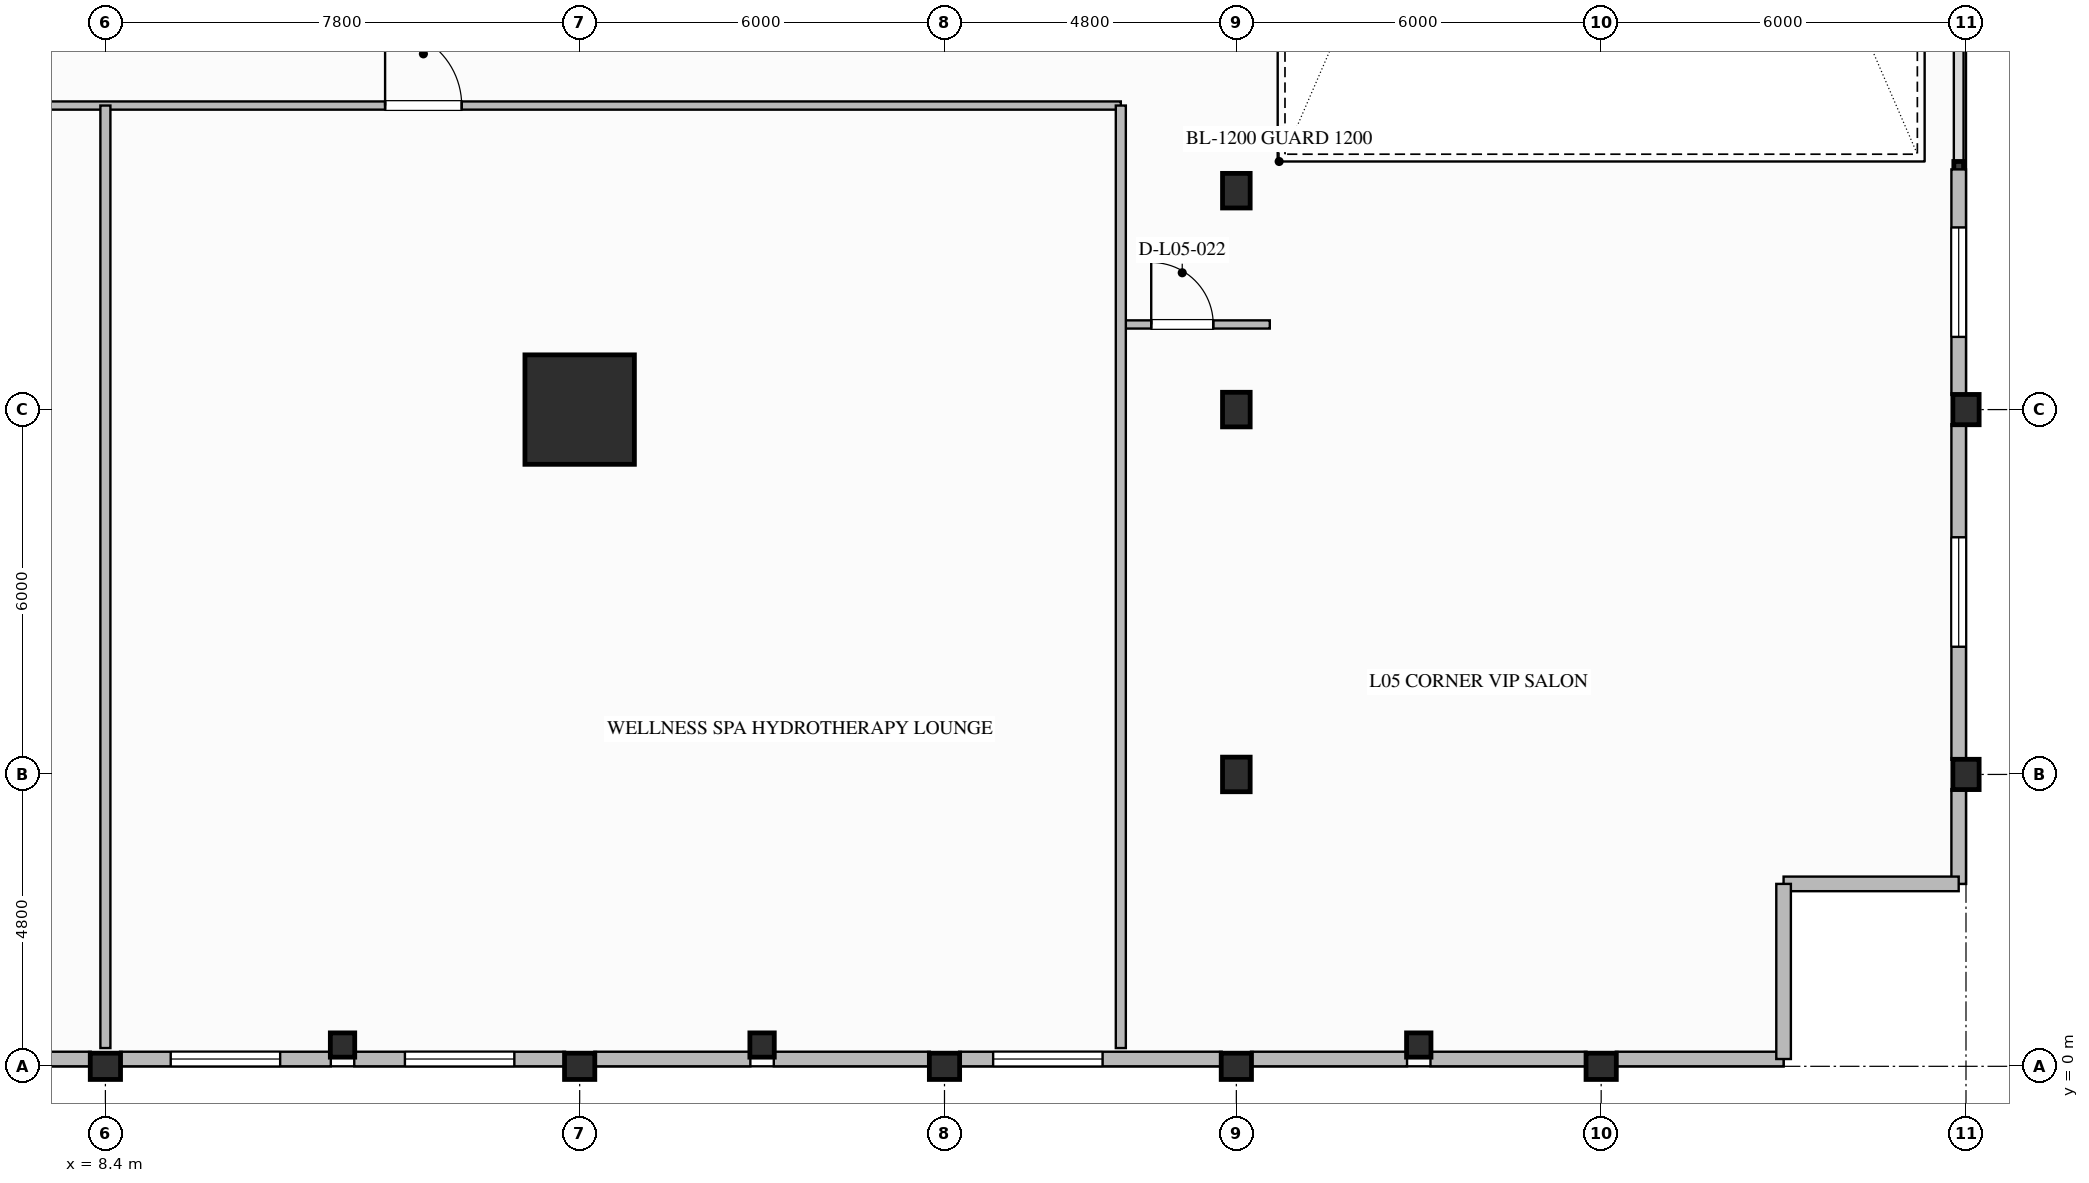
"""IFC4 building model, lengths in metres.
Left out: names, types, materials, properties, quantities, classifications, styles, units other than length and angle.
Written with IfcOpenShell. Run it as: python <this file> out.ifc"""

import sys

from ifc_helpers import new_model, si_unit, direction, frame, frame_2d, origin, origin_2d, place, context, subcontext, project, spatial, rectangle, i_section, extrude, element, fill, save


model = new_model("IFC4")
c1 = context("Model", 3, precision=1e-05, world=origin(), true_north=direction((0.0, 1.0)))
c2 = subcontext(c1, "Body", "Model", "MODEL_VIEW")
j1 = project(units=[si_unit("LENGTHUNIT", "METRE"), si_unit("PLANEANGLEUNIT", "RADIAN")], contexts=[c1])
p1 = place(None, origin())
s1 = spatial("IfcSite", under=j1, at=p1, CompositionType="ELEMENT")
p2 = place(p1, origin())
s2 = spatial("IfcBuilding", under=s1, at=p2, CompositionType="ELEMENT")
p3 = place(p2, frame((0.0, 0.0, 27.6)))
s3 = spatial("IfcBuildingStorey", under=s2, at=p3, CompositionType="ELEMENT", Elevation=27.6)
p4 = place(p3, frame((16.2, 10.8, 0.0), z_axis=(0.0, 0.0, 1.0), x_axis=(1.0, 0.0, 0.0)))
e1 = element("IfcColumn", 1, at=p4, inside=s3, PredefinedType="COLUMN", context=c2, shape_type="SweptSolid", body=[
    extrude(rectangle(XDim=1.8, YDim=1.8, at=origin_2d()), origin(), (0.0, 0.0, 1.0), 5.6),
])
for number, where, z_axis, x_axis in (
    (2, (39.0, 4.8, 0.0), (0.0, 0.0, 1.0), (1.0, 0.0, 0.0)),
    (3, (39.0, 10.8, 0.0), (0.0, 0.0, 1.0), (1.0, 0.0, 0.0)),
    (4, (8.4, 0.0, 0.0), (0.0, 0.0, 1.0), (0.0, 1.0, 0.0)),
    (5, (16.2, 0.0, 0.0), (0.0, 0.0, 1.0), (0.0, 1.0, 0.0)),
    (6, (22.2, 0.0, 0.0), (0.0, 0.0, 1.0), (0.0, 1.0, 0.0)),
    (7, (27.0, 0.0, 0.0), (0.0, 0.0, 1.0), (0.0, 1.0, 0.0)),
    (8, (33.0, 0.0, 0.0), (0.0, 0.0, 1.0), (0.0, 1.0, 0.0)),
):
    element("IfcColumn", number, at=place(p3, frame(where, z_axis=z_axis, x_axis=x_axis)), inside=s3, PredefinedType="COLUMN", context=c2, shape_type="SweptSolid", body=[
        extrude(i_section(OverallWidth=0.432, OverallDepth=0.498, WebThickness=0.056, FlangeThickness=0.089, FilletRadius=0.03, at=origin_2d()), origin(), (0.0, 0.0, 1.0), 5.32),
    ])
for number, where, z_axis, x_axis in (
    (9, (27.0, 4.8, 0.0), (0.0, 0.0, 1.0), (1.0, 0.0, 0.0)),
    (10, (27.0, 10.8, 0.0), (0.0, 0.0, 1.0), (1.0, 0.0, 0.0)),
    (11, (27.0, 14.4, 0.0), (0.0, 0.0, 1.0), (1.0, 0.0, 0.0)),
):
    element("IfcColumn", number, at=place(p3, frame(where, z_axis=z_axis, x_axis=x_axis)), inside=s3, PredefinedType="COLUMN", context=c2, shape_type="SweptSolid", body=[
        extrude(i_section(OverallWidth=0.454, OverallDepth=0.569, WebThickness=0.078, FlangeThickness=0.125, FilletRadius=0.03, at=origin_2d()), origin(), (0.0, 0.0, 1.0), 5.32),
    ])
for number, where, z_axis, x_axis in (
    (12, (12.3, 0.35, 0.0), (0.0, 0.0, 1.0), (1.0, 0.0, 0.0)),
    (13, (19.2, 0.35, 0.0), (0.0, 0.0, 1.0), (1.0, 0.0, 0.0)),
    (14, (30.0, 0.35, 0.0), (0.0, 0.0, 1.0), (1.0, 0.0, 0.0)),
):
    element("IfcColumn", number, at=place(p3, frame(where, z_axis=z_axis, x_axis=x_axis)), inside=s3, PredefinedType="COLUMN", context=c2, shape_type="SweptSolid", body=[
        extrude(i_section(OverallWidth=0.401, OverallDepth=0.399, WebThickness=0.025, FlangeThickness=0.04, FilletRadius=0.025, at=origin_2d()), origin(), (0.0, 0.0, 1.0), 5.32),
    ])
p5 = place(p3, frame((38.88, 4.559, 0.0), z_axis=(0.0, 0.0, 1.0), x_axis=(0.0, -1.0, 0.0)))
e15 = element("IfcWall", 15, at=p5, inside=s3, PredefinedType="STANDARD", context=c2, shape_type="SweptSolid", body=[
    extrude(rectangle(XDim=1.559, YDim=0.24, at=frame_2d((0.78, 0.0))), origin(), (0.0, 0.0, 1.0), 5.32),
])
p6 = place(p3, frame((38.88, 10.559, 0.0), z_axis=(0.0, 0.0, 1.0), x_axis=(0.0, -1.0, 0.0)))
e16 = element("IfcWall", 16, at=p6, inside=s3, PredefinedType="STANDARD", context=c2, shape_type="SweptSolid", body=[
    extrude(rectangle(XDim=5.518, YDim=0.24, at=frame_2d((2.759, 0.0))), origin(), (0.0, 0.0, 1.0), 4.625),
])
p7 = place(p6, frame((1.859, 0.0, 0.85)))
e17 = element("IfcOpeningElement", 17, at=p7, cuts=e16, PredefinedType="OPENING", context=c2, shape_type="SweptSolid", body=[
    extrude(rectangle(XDim=1.8, YDim=2.2, at=frame_2d((0.9, 1.1))), frame((0.0, 0.13, 0.0), z_axis=(0.0, -1.0, 0.0), x_axis=(1.0, 0.0, 0.0)), (0.0, 0.0, 1.0), 0.26),
])
p8 = place(p3, frame((38.88, 14.75, 0.0), z_axis=(0.0, 0.0, 1.0), x_axis=(0.0, -1.0, 0.0)))
e18 = element("IfcWall", 18, at=p8, inside=s3, PredefinedType="STANDARD", context=c2, shape_type="SweptSolid", body=[
    extrude(rectangle(XDim=3.709, YDim=0.24, at=frame_2d((1.854, 0.0))), origin(), (0.0, 0.0, 1.0), 4.625),
])
p9 = place(p8, frame((0.955, 0.0, 0.85)))
e19 = element("IfcOpeningElement", 19, at=p9, cuts=e18, PredefinedType="OPENING", context=c2, shape_type="SweptSolid", body=[
    extrude(rectangle(XDim=1.8, YDim=2.2, at=frame_2d((0.9, 1.1))), frame((0.0, 0.13, 0.0), z_axis=(0.0, -1.0, 0.0), x_axis=(1.0, 0.0, 0.0)), (0.0, 0.0, 1.0), 0.26),
])
p10 = place(p3, frame((8.159, 0.12, 0.0), z_axis=(0.0, 0.0, 1.0), x_axis=(-1.0, 0.0, 0.0)))
e20 = element("IfcWall", 20, at=p10, inside=s3, PredefinedType="STANDARD", context=c2, shape_type="SweptSolid", body=[
    extrude(rectangle(XDim=3.767, YDim=0.24, at=frame_2d((1.883, 0.0))), origin(), (0.0, 0.0, 1.0), 3.52),
])
p11 = place(p10, frame((0.983, 0.0, 0.65)))
e21 = element("IfcOpeningElement", 21, at=p11, cuts=e20, PredefinedType="OPENING", context=c2, shape_type="SweptSolid", body=[
    extrude(rectangle(XDim=1.8, YDim=2.2, at=frame_2d((0.9, 1.1))), frame((0.0, 0.13, 0.0), z_axis=(0.0, -1.0, 0.0), x_axis=(1.0, 0.0, 0.0)), (0.0, 0.0, 1.0), 0.26),
])
p12 = place(p3, frame((12.107, 0.12, 0.0), z_axis=(0.0, 0.0, 1.0), x_axis=(-1.0, 0.0, 0.0)))
e22 = element("IfcWall", 22, at=p12, inside=s3, PredefinedType="STANDARD", context=c2, shape_type="SweptSolid", body=[
    extrude(rectangle(XDim=3.467, YDim=0.24, at=frame_2d((1.733, 0.0))), origin(), (0.0, 0.0, 1.0), 3.52),
])
p13 = place(p12, frame((0.833, 0.0, 0.65)))
e23 = element("IfcOpeningElement", 23, at=p13, cuts=e22, PredefinedType="OPENING", context=c2, shape_type="SweptSolid", body=[
    extrude(rectangle(XDim=1.8, YDim=2.2, at=frame_2d((0.9, 1.1))), frame((0.0, 0.13, 0.0), z_axis=(0.0, -1.0, 0.0), x_axis=(1.0, 0.0, 0.0)), (0.0, 0.0, 1.0), 0.26),
])
p14 = place(p3, frame((15.959, 0.12, 0.0), z_axis=(0.0, 0.0, 1.0), x_axis=(-1.0, 0.0, 0.0)))
e24 = element("IfcWall", 24, at=p14, inside=s3, PredefinedType="STANDARD", context=c2, shape_type="SweptSolid", body=[
    extrude(rectangle(XDim=3.466, YDim=0.24, at=frame_2d((1.733, 0.0))), origin(), (0.0, 0.0, 1.0), 3.52),
])
p15 = place(p14, frame((0.833, 0.0, 0.65)))
e25 = element("IfcOpeningElement", 25, at=p15, cuts=e24, PredefinedType="OPENING", context=c2, shape_type="SweptSolid", body=[
    extrude(rectangle(XDim=1.8, YDim=2.2, at=frame_2d((0.9, 1.1))), frame((0.0, 0.13, 0.0), z_axis=(0.0, -1.0, 0.0), x_axis=(1.0, 0.0, 0.0)), (0.0, 0.0, 1.0), 0.26),
])
for number, where, z_axis, x_axis in (
    (26, (19.007, 0.12, 0.0), (0.0, 0.0, 1.0), (-1.0, 0.0, 0.0)),
    (27, (21.959, 0.12, 0.0), (0.0, 0.0, 1.0), (-1.0, 0.0, 0.0)),
):
    element("IfcWall", number, at=place(p3, frame(where, z_axis=z_axis, x_axis=x_axis)), inside=s3, PredefinedType="STANDARD", context=c2, shape_type="SweptSolid", body=[
        extrude(rectangle(XDim=2.566, YDim=0.24, at=frame_2d((1.283, 0.0))), origin(), (0.0, 0.0, 1.0), 4.625),
    ])
p16 = place(p3, frame((26.759, 0.12, 0.0), z_axis=(0.0, 0.0, 1.0), x_axis=(-1.0, 0.0, 0.0)))
e28 = element("IfcWall", 28, at=p16, inside=s3, PredefinedType="STANDARD", context=c2, shape_type="SweptSolid", body=[
    extrude(rectangle(XDim=4.318, YDim=0.24, at=frame_2d((2.159, 0.0))), origin(), (0.0, 0.0, 1.0), 4.625),
])
p17 = place(p16, frame((1.959, 0.0, 0.65)))
e29 = element("IfcOpeningElement", 29, at=p17, cuts=e28, PredefinedType="OPENING", context=c2, shape_type="SweptSolid", body=[
    extrude(rectangle(XDim=1.8, YDim=2.2, at=frame_2d((0.9, 1.1))), frame((0.0, 0.13, 0.0), z_axis=(0.0, -1.0, 0.0), x_axis=(1.0, 0.0, 0.0)), (0.0, 0.0, 1.0), 0.26),
])
for number, where, z_axis, x_axis in (
    (30, (29.807, 0.12, 0.0), (0.0, 0.0, 1.0), (-1.0, 0.0, 0.0)),
    (31, (32.759, 0.12, 0.0), (0.0, 0.0, 1.0), (-1.0, 0.0, 0.0)),
):
    element("IfcWall", number, at=place(p3, frame(where, z_axis=z_axis, x_axis=x_axis)), inside=s3, PredefinedType="STANDARD", context=c2, shape_type="SweptSolid", body=[
        extrude(rectangle(XDim=2.566, YDim=0.24, at=frame_2d((1.283, 0.0))), origin(), (0.0, 0.0, 1.0), 4.625),
    ])
p18 = place(p3, frame((36.0, 0.12, 0.0), z_axis=(0.0, 0.0, 1.0), x_axis=(-1.0, 0.0, 0.0)))
e32 = element("IfcWall", 32, at=p18, inside=s3, PredefinedType="STANDARD", context=c2, shape_type="SweptSolid", body=[
    extrude(rectangle(XDim=2.759, YDim=0.24, at=frame_2d((1.379, 0.0))), origin(), (0.0, 0.0, 1.0), 5.32),
])
for number, where, z_axis, x_axis in (
    (33, (38.88, 3.0, 0.0), (0.0, 0.0, 1.0), (-1.0, 0.0, 0.0)),
    (34, (36.0, 3.0, 0.0), (0.0, 0.0, 1.0), (0.0, -1.0, 0.0)),
):
    element("IfcWall", number, at=place(p3, frame(where, z_axis=z_axis, x_axis=x_axis)), inside=s3, PredefinedType="STANDARD", context=c2, shape_type="SweptSolid", body=[
        extrude(rectangle(XDim=2.88, YDim=0.24, at=frame_2d((1.44, 0.0))), origin(), (0.0, 0.0, 1.0), 5.32),
    ])
p19 = place(p3, frame((-21.2, 15.8, 0.0), z_axis=(0.0, 0.0, 1.0), x_axis=(1.0, 0.0, 0.0)))
e35 = element("IfcWall", 35, at=p19, inside=s3, PredefinedType="PARTITIONING", context=c2, shape_type="SweptSolid", body=[
    extrude(rectangle(XDim=46.3, YDim=0.135, at=frame_2d((23.15, 0.0))), origin(), (0.0, 0.0, 1.0), 5.32),
])
p20 = place(p19, frame((8.0, 0.0, 0.0)))
e36 = element("IfcOpeningElement", 36, at=p20, cuts=e35, PredefinedType="OPENING", context=c2, shape_type="SweptSolid", body=[
    extrude(rectangle(XDim=1.8, YDim=2.35, at=frame_2d((0.9, 1.175))), frame((0.0, 0.077, 0.0), z_axis=(0.0, -1.0, 0.0), x_axis=(1.0, 0.0, 0.0)), (0.0, 0.0, 1.0), 0.155),
])
p21 = place(p19, frame((34.2, 0.0, 0.0)))
e37 = element("IfcOpeningElement", 37, at=p21, cuts=e35, PredefinedType="OPENING", context=c2, shape_type="SweptSolid", body=[
    extrude(rectangle(XDim=1.26, YDim=2.2, at=frame_2d((0.63, 1.1))), frame((0.0, 0.077, 0.0), z_axis=(0.0, -1.0, 0.0), x_axis=(1.0, 0.0, 0.0)), (0.0, 0.0, 1.0), 0.155),
])
p22 = place(p3, frame((25.1, 12.2, 0.0), z_axis=(0.0, 0.0, 1.0), x_axis=(1.0, 0.0, 0.0)))
e38 = element("IfcWall", 38, at=p22, inside=s3, PredefinedType="PARTITIONING", context=c2, shape_type="SweptSolid", body=[
    extrude(rectangle(XDim=2.45, YDim=0.135, at=frame_2d((1.225, 0.0))), origin(), (0.0, 0.0, 1.0), 5.32),
])
p23 = place(p22, frame((0.5, 0.0, 0.0)))
e39 = element("IfcOpeningElement", 39, at=p23, cuts=e38, PredefinedType="OPENING", context=c2, shape_type="SweptSolid", body=[
    extrude(rectangle(XDim=1.02, YDim=2.15, at=frame_2d((0.51, 1.075))), frame((0.0, 0.077, 0.0), z_axis=(0.0, -1.0, 0.0), x_axis=(1.0, 0.0, 0.0)), (0.0, 0.0, 1.0), 0.155),
])
p24 = place(p3, frame((25.1, 0.3, 0.0), z_axis=(0.0, 0.0, 1.0), x_axis=(0.0, 1.0, 0.0)))
e40 = element("IfcWall", 40, at=p24, inside=s3, PredefinedType="PARTITIONING", context=c2, shape_type="SweptSolid", body=[
    extrude(rectangle(XDim=15.5, YDim=0.165, at=frame_2d((7.75, 0.0))), origin(), (0.0, 0.0, 1.0), 5.32),
])
p25 = place(p3, frame((8.4, 0.3, 0.0), z_axis=(0.0, 0.0, 1.0), x_axis=(0.0, 1.0, 0.0)))
e41 = element("IfcWall", 41, at=p25, inside=s3, PredefinedType="PARTITIONING", context=c2, shape_type="SweptSolid", body=[
    extrude(rectangle(XDim=15.5, YDim=0.165, at=frame_2d((7.75, 0.0))), origin(), (0.0, 0.0, 1.0), 3.505),
])
p26 = place(p7, origin())
e42 = element("IfcWindow", 42, at=p26, inside=s3, PartitioningType="SINGLE_PANEL", PredefinedType="WINDOW", context=c2, shape_type="SweptSolid", body=[
    extrude(rectangle(XDim=1.8, YDim=2.2, at=frame_2d((0.9, 1.1))), frame((0.0, 0.03, 0.0), z_axis=(0.0, -1.0, 0.0), x_axis=(1.0, 0.0, 0.0)), (0.0, 0.0, 1.0), 0.06),
])
fill(e17, e42)
p27 = place(p9, origin())
e43 = element("IfcWindow", 43, at=p27, inside=s3, PartitioningType="SINGLE_PANEL", PredefinedType="WINDOW", context=c2, shape_type="SweptSolid", body=[
    extrude(rectangle(XDim=1.8, YDim=2.2, at=frame_2d((0.9, 1.1))), frame((0.0, 0.03, 0.0), z_axis=(0.0, -1.0, 0.0), x_axis=(1.0, 0.0, 0.0)), (0.0, 0.0, 1.0), 0.06),
])
fill(e19, e43)
p28 = place(p13, origin())
e44 = element("IfcWindow", 44, at=p28, inside=s3, PartitioningType="SINGLE_PANEL", PredefinedType="WINDOW", context=c2, shape_type="SweptSolid", body=[
    extrude(rectangle(XDim=1.8, YDim=2.2, at=frame_2d((0.9, 1.1))), frame((0.0, 0.03, 0.0), z_axis=(0.0, -1.0, 0.0), x_axis=(1.0, 0.0, 0.0)), (0.0, 0.0, 1.0), 0.06),
])
fill(e23, e44)
p29 = place(p15, origin())
e45 = element("IfcWindow", 45, at=p29, inside=s3, PartitioningType="SINGLE_PANEL", PredefinedType="WINDOW", context=c2, shape_type="SweptSolid", body=[
    extrude(rectangle(XDim=1.8, YDim=2.2, at=frame_2d((0.9, 1.1))), frame((0.0, 0.03, 0.0), z_axis=(0.0, -1.0, 0.0), x_axis=(1.0, 0.0, 0.0)), (0.0, 0.0, 1.0), 0.06),
])
fill(e25, e45)
p30 = place(p17, origin())
e46 = element("IfcWindow", 46, at=p30, inside=s3, PartitioningType="SINGLE_PANEL", PredefinedType="WINDOW", context=c2, shape_type="SweptSolid", body=[
    extrude(rectangle(XDim=1.8, YDim=2.2, at=frame_2d((0.9, 1.1))), frame((0.0, 0.03, 0.0), z_axis=(0.0, -1.0, 0.0), x_axis=(1.0, 0.0, 0.0)), (0.0, 0.0, 1.0), 0.06),
])
fill(e29, e46)
p31 = place(p23, origin())
e47 = element("IfcDoor", 47, at=p31, inside=s3, OperationType="SINGLE_SWING_LEFT", PredefinedType="DOOR", context=c2, shape_type="SweptSolid", body=[
    extrude(rectangle(XDim=1.02, YDim=2.15, at=frame_2d((0.51, 1.075))), frame((0.0, 0.025, 0.0), z_axis=(0.0, -1.0, 0.0), x_axis=(1.0, 0.0, 0.0)), (0.0, 0.0, 1.0), 0.05),
])
fill(e39, e47)
p32 = place(p21, origin())
e48 = element("IfcDoor", 48, at=p32, inside=s3, OperationType="SINGLE_SWING_LEFT", PredefinedType="DOOR", context=c2, shape_type="SweptSolid", body=[
    extrude(rectangle(XDim=1.26, YDim=2.2, at=frame_2d((0.63, 1.1))), frame((0.0, 0.025, 0.0), z_axis=(0.0, -1.0, 0.0), x_axis=(1.0, 0.0, 0.0)), (0.0, 0.0, 1.0), 0.05),
])
fill(e37, e48)
save(model, sys.argv[1])
